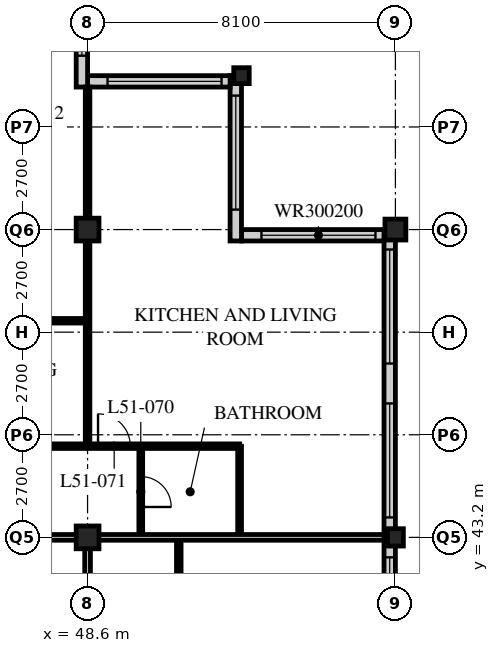
"""IFC4 building model, lengths in metres.
Left out: names, types, materials, properties, quantities, classifications, styles, units other than length and angle.
Written with IfcOpenShell. Run it as: python <this file> out.ifc"""

import sys

from ifc_helpers import new_model, si_unit, direction, frame, frame_2d, origin, origin_2d, place, context, subcontext, project, spatial, rectangle, hollow_rectangle, i_section, extrude, element, fill, save


model = new_model("IFC4")
c1 = context("Model", 3, precision=1e-05, world=origin(), true_north=direction((0.0, 1.0)))
c2 = subcontext(c1, "Body", "Model", "MODEL_VIEW")
j1 = project(units=[si_unit("LENGTHUNIT", "METRE"), si_unit("PLANEANGLEUNIT", "RADIAN")], contexts=[c1])
p1 = place(None, origin())
s1 = spatial("IfcSite", under=j1, at=p1, CompositionType="ELEMENT")
p2 = place(p1, origin())
s2 = spatial("IfcBuilding", under=s1, at=p2, CompositionType="ELEMENT")
p3 = place(p2, frame((0.0, 0.0, 199.2)))
s3 = spatial("IfcBuildingStorey", under=s2, at=p3, CompositionType="ELEMENT", Elevation=199.2)
for number, where, z_axis, x_axis in (
    (1, (48.6, 43.2, 0.0), (0.0, 0.0, 1.0), (1.0, 0.0, 0.0)),
    (2, (48.6, 51.3, 0.0), (0.0, 0.0, 1.0), (1.0, 0.0, 0.0)),
):
    element("IfcColumn", number, at=place(p3, frame(where, z_axis=z_axis, x_axis=x_axis)), inside=s3, PredefinedType="COLUMN", context=c2, shape_type="SweptSolid", body=[
        extrude(hollow_rectangle(XDim=0.6, YDim=0.6, WallThickness=0.05, at=origin_2d()), origin(), (0.0, 0.0, 1.0), 3.6),
    ])
p4 = place(p3, frame((52.65, 55.35, 0.0), z_axis=(0.0, 0.0, 1.0), x_axis=(1.0, 0.0, 0.0)))
e3 = element("IfcColumn", 3, at=p4, inside=s3, PredefinedType="COLUMN", context=c2, shape_type="SweptSolid", body=[
    extrude(i_section(OverallWidth=0.407, OverallDepth=0.419, WebThickness=0.031, FlangeThickness=0.049, FilletRadius=0.015, at=origin_2d()), origin(), (0.0, 0.0, 1.0), 3.6),
])
p5 = place(p3, frame((56.7, 43.2, 0.0), z_axis=(0.0, 0.0, 1.0), x_axis=(1.0, 0.0, 0.0)))
e4 = element("IfcColumn", 4, at=p5, inside=s3, PredefinedType="COLUMN", context=c2, shape_type="SweptSolid", body=[
    extrude(i_section(OverallWidth=0.418, OverallDepth=0.456, WebThickness=0.042, FlangeThickness=0.067, FilletRadius=0.015, at=origin_2d()), origin(), (0.0, 0.0, 1.0), 3.6),
])
p6 = place(p3, frame((56.7, 51.3, 0.0), z_axis=(0.0, 0.0, 1.0), x_axis=(1.0, 0.0, 0.0)))
e5 = element("IfcColumn", 5, at=p6, inside=s3, PredefinedType="COLUMN", context=c2, shape_type="SweptSolid", body=[
    extrude(hollow_rectangle(XDim=0.55, YDim=0.55, WallThickness=0.045, at=origin_2d()), origin(), (0.0, 0.0, 1.0), 3.6),
])
p7 = place(p3, frame((56.55, 19.2, 0.0), z_axis=(0.0, 0.0, 1.0), x_axis=(0.0, 1.0, 0.0)))
e6 = element("IfcWall", 6, at=p7, inside=s3, PredefinedType="SOLIDWALL", context=c2, shape_type="SweptSolid", body=[
    extrude(rectangle(XDim=32.1, YDim=0.3, at=frame_2d((16.05, 0.0))), origin(), (0.0, 0.0, 1.0), 3.39),
])
p8 = place(p7, frame((0.225, 0.0, 0.6)))
e7 = element("IfcOpeningElement", 7, at=p8, cuts=e6, PredefinedType="OPENING", context=c2, shape_type="SweptSolid", body=[
    extrude(rectangle(XDim=3.0, YDim=2.4, at=frame_2d((1.5, 1.2))), frame((0.0, 0.16, 0.0), z_axis=(0.0, -1.0, 0.0), x_axis=(1.0, 0.0, 0.0)), (0.0, 0.0, 1.0), 0.32),
])
p9 = place(p7, frame((4.275, 0.0, 0.6)))
e8 = element("IfcOpeningElement", 8, at=p9, cuts=e6, PredefinedType="OPENING", context=c2, shape_type="SweptSolid", body=[
    extrude(rectangle(XDim=3.0, YDim=2.4, at=frame_2d((1.5, 1.2))), frame((0.0, 0.16, 0.0), z_axis=(0.0, -1.0, 0.0), x_axis=(1.0, 0.0, 0.0)), (0.0, 0.0, 1.0), 0.32),
])
p10 = place(p7, frame((8.325, 0.0, 0.6)))
e9 = element("IfcOpeningElement", 9, at=p10, cuts=e6, PredefinedType="OPENING", context=c2, shape_type="SweptSolid", body=[
    extrude(rectangle(XDim=3.0, YDim=2.4, at=frame_2d((1.5, 1.2))), frame((0.0, 0.16, 0.0), z_axis=(0.0, -1.0, 0.0), x_axis=(1.0, 0.0, 0.0)), (0.0, 0.0, 1.0), 0.32),
])
p11 = place(p7, frame((12.375, 0.0, 0.6)))
e10 = element("IfcOpeningElement", 10, at=p11, cuts=e6, PredefinedType="OPENING", context=c2, shape_type="SweptSolid", body=[
    extrude(rectangle(XDim=3.0, YDim=2.4, at=frame_2d((1.5, 1.2))), frame((0.0, 0.16, 0.0), z_axis=(0.0, -1.0, 0.0), x_axis=(1.0, 0.0, 0.0)), (0.0, 0.0, 1.0), 0.32),
])
p12 = place(p7, frame((16.425, 0.0, 0.6)))
e11 = element("IfcOpeningElement", 11, at=p12, cuts=e6, PredefinedType="OPENING", context=c2, shape_type="SweptSolid", body=[
    extrude(rectangle(XDim=3.0, YDim=2.4, at=frame_2d((1.5, 1.2))), frame((0.0, 0.16, 0.0), z_axis=(0.0, -1.0, 0.0), x_axis=(1.0, 0.0, 0.0)), (0.0, 0.0, 1.0), 0.32),
])
p13 = place(p7, frame((20.475, 0.0, 0.6)))
e12 = element("IfcOpeningElement", 12, at=p13, cuts=e6, PredefinedType="OPENING", context=c2, shape_type="SweptSolid", body=[
    extrude(rectangle(XDim=3.0, YDim=2.4, at=frame_2d((1.5, 1.2))), frame((0.0, 0.16, 0.0), z_axis=(0.0, -1.0, 0.0), x_axis=(1.0, 0.0, 0.0)), (0.0, 0.0, 1.0), 0.32),
])
p14 = place(p7, frame((24.525, 0.0, 0.6)))
e13 = element("IfcOpeningElement", 13, at=p14, cuts=e6, PredefinedType="OPENING", context=c2, shape_type="SweptSolid", body=[
    extrude(rectangle(XDim=3.0, YDim=2.4, at=frame_2d((1.5, 1.2))), frame((0.0, 0.16, 0.0), z_axis=(0.0, -1.0, 0.0), x_axis=(1.0, 0.0, 0.0)), (0.0, 0.0, 1.0), 0.32),
])
p15 = place(p7, frame((28.575, 0.0, 0.6)))
e14 = element("IfcOpeningElement", 14, at=p15, cuts=e6, PredefinedType="OPENING", context=c2, shape_type="SweptSolid", body=[
    extrude(rectangle(XDim=3.0, YDim=2.4, at=frame_2d((1.5, 1.2))), frame((0.0, 0.16, 0.0), z_axis=(0.0, -1.0, 0.0), x_axis=(1.0, 0.0, 0.0)), (0.0, 0.0, 1.0), 0.32),
])
p16 = place(p3, frame((56.4, 51.15, 0.0), z_axis=(0.0, 0.0, 1.0), x_axis=(-1.0, 0.0, 0.0)))
e15 = element("IfcWall", 15, at=p16, inside=s3, PredefinedType="SOLIDWALL", context=c2, shape_type="SweptSolid", body=[
    extrude(rectangle(XDim=3.75, YDim=0.3, at=frame_2d((1.875, 0.0))), origin(), (0.0, 0.0, 1.0), 3.39),
])
p17 = place(p16, frame((0.225, 0.0, 0.6)))
e16 = element("IfcOpeningElement", 16, at=p17, cuts=e15, PredefinedType="OPENING", context=c2, shape_type="SweptSolid", body=[
    extrude(rectangle(XDim=3.0, YDim=2.0, at=frame_2d((1.5, 1.0))), frame((0.0, 0.16, 0.0), z_axis=(0.0, -1.0, 0.0), x_axis=(1.0, 0.0, 0.0)), (0.0, 0.0, 1.0), 0.32),
])
p18 = place(p3, frame((52.5, 51.0, 0.0), z_axis=(0.0, 0.0, 1.0), x_axis=(0.0, 1.0, 0.0)))
e17 = element("IfcWall", 17, at=p18, inside=s3, PredefinedType="SOLIDWALL", context=c2, shape_type="SweptSolid", body=[
    extrude(rectangle(XDim=4.35, YDim=0.3, at=frame_2d((2.175, 0.0))), origin(), (0.0, 0.0, 1.0), 3.39),
])
p19 = place(p18, frame((0.825, 0.0, 0.6)))
e18 = element("IfcOpeningElement", 18, at=p19, cuts=e17, PredefinedType="OPENING", context=c2, shape_type="SweptSolid", body=[
    extrude(rectangle(XDim=3.0, YDim=2.0, at=frame_2d((1.5, 1.0))), frame((0.0, 0.16, 0.0), z_axis=(0.0, -1.0, 0.0), x_axis=(1.0, 0.0, 0.0)), (0.0, 0.0, 1.0), 0.32),
])
p20 = place(p3, frame((52.35, 55.2, 0.0), z_axis=(0.0, 0.0, 1.0), x_axis=(-1.0, 0.0, 0.0)))
e19 = element("IfcWall", 19, at=p20, inside=s3, PredefinedType="SOLIDWALL", context=c2, shape_type="SweptSolid", body=[
    extrude(rectangle(XDim=3.75, YDim=0.3, at=frame_2d((1.875, 0.0))), origin(), (0.0, 0.0, 1.0), 3.39),
])
p21 = place(p20, frame((0.225, 0.0, 0.6)))
e20 = element("IfcOpeningElement", 20, at=p21, cuts=e19, PredefinedType="OPENING", context=c2, shape_type="SweptSolid", body=[
    extrude(rectangle(XDim=3.0, YDim=2.0, at=frame_2d((1.5, 1.0))), frame((0.0, 0.16, 0.0), z_axis=(0.0, -1.0, 0.0), x_axis=(1.0, 0.0, 0.0)), (0.0, 0.0, 1.0), 0.32),
])
p22 = place(p3, frame((48.45, 55.05, 0.0), z_axis=(0.0, 0.0, 1.0), x_axis=(0.0, 1.0, 0.0)))
e21 = element("IfcWall", 21, at=p22, inside=s3, PredefinedType="SOLIDWALL", context=c2, shape_type="SweptSolid", body=[
    extrude(rectangle(XDim=4.35, YDim=0.3, at=frame_2d((2.175, 0.0))), origin(), (0.0, 0.0, 1.0), 3.39),
])
p23 = place(p22, frame((0.825, 0.0, 0.6)))
e22 = element("IfcOpeningElement", 22, at=p23, cuts=e21, PredefinedType="OPENING", context=c2, shape_type="SweptSolid", body=[
    extrude(rectangle(XDim=3.0, YDim=2.0, at=frame_2d((1.5, 1.0))), frame((0.0, 0.16, 0.0), z_axis=(0.0, -1.0, 0.0), x_axis=(1.0, 0.0, 0.0)), (0.0, 0.0, 1.0), 0.32),
])
p24 = place(p3, frame((8.1, 43.2, 0.0), z_axis=(0.0, 0.0, 1.0), x_axis=(1.0, 0.0, 0.0)))
e23 = element("IfcWall", 23, at=p24, inside=s3, PredefinedType="PARTITIONING", context=c2, shape_type="SweptSolid", body=[
    extrude(rectangle(XDim=40.5, YDim=0.15, at=frame_2d((20.25, 0.0))), origin(), (0.0, 0.0, 1.0), 2.778),
])
p25 = place(p24, frame((4.45, 0.0, 0.0)))
e24 = element("IfcOpeningElement", 24, at=p25, cuts=e23, PredefinedType="OPENING", context=c2, shape_type="SweptSolid", body=[
    extrude(rectangle(XDim=1.0, YDim=2.1, at=frame_2d((0.5, 1.05))), frame((0.0, 0.085, 0.0), z_axis=(0.0, -1.0, 0.0), x_axis=(1.0, 0.0, 0.0)), (0.0, 0.0, 1.0), 0.17),
])
p26 = place(p24, frame((20.65, 0.0, 0.0)))
e25 = element("IfcOpeningElement", 25, at=p26, cuts=e23, PredefinedType="OPENING", context=c2, shape_type="SweptSolid", body=[
    extrude(rectangle(XDim=1.0, YDim=2.1, at=frame_2d((0.5, 1.05))), frame((0.0, 0.085, 0.0), z_axis=(0.0, -1.0, 0.0), x_axis=(1.0, 0.0, 0.0)), (0.0, 0.0, 1.0), 0.17),
])
p27 = place(p24, frame((28.75, 0.0, 0.0)))
e26 = element("IfcOpeningElement", 26, at=p27, cuts=e23, PredefinedType="OPENING", context=c2, shape_type="SweptSolid", body=[
    extrude(rectangle(XDim=1.0, YDim=2.1, at=frame_2d((0.5, 1.05))), frame((0.0, 0.085, 0.0), z_axis=(0.0, -1.0, 0.0), x_axis=(1.0, 0.0, 0.0)), (0.0, 0.0, 1.0), 0.17),
])
p28 = place(p24, frame((37.975, 0.0, 0.0)))
e27 = element("IfcOpeningElement", 27, at=p28, cuts=e23, PredefinedType="OPENING", context=c2, shape_type="SweptSolid", body=[
    extrude(rectangle(XDim=1.0, YDim=2.1, at=frame_2d((0.5, 1.05))), frame((0.0, 0.085, 0.0), z_axis=(0.0, -1.0, 0.0), x_axis=(1.0, 0.0, 0.0)), (0.0, 0.0, 1.0), 0.17),
])
p29 = place(p24, frame((1.525, 0.0, 0.0)))
e28 = element("IfcOpeningElement", 28, at=p29, cuts=e23, PredefinedType="OPENING", context=c2, shape_type="SweptSolid", body=[
    extrude(rectangle(XDim=1.0, YDim=2.1, at=frame_2d((0.5, 1.05))), frame((0.0, 0.085, 0.0), z_axis=(0.0, -1.0, 0.0), x_axis=(1.0, 0.0, 0.0)), (0.0, 0.0, 1.0), 0.17),
])
p30 = place(p3, frame((48.6, 18.9, 0.0), z_axis=(0.0, 0.0, 1.0), x_axis=(0.0, 1.0, 0.0)))
e29 = element("IfcWall", 29, at=p30, inside=s3, PredefinedType="PARTITIONING", context=c2, shape_type="SweptSolid", body=[
    extrude(rectangle(XDim=24.3, YDim=0.15, at=frame_2d((12.15, 0.0))), origin(), (0.0, 0.0, 1.0), 2.778),
])
p31 = place(p30, frame((2.35, 0.0, 0.0)))
e30 = element("IfcOpeningElement", 30, at=p31, cuts=e29, PredefinedType="OPENING", context=c2, shape_type="SweptSolid", body=[
    extrude(rectangle(XDim=1.0, YDim=2.1, at=frame_2d((0.5, 1.05))), frame((0.0, 0.085, 0.0), z_axis=(0.0, -1.0, 0.0), x_axis=(1.0, 0.0, 0.0)), (0.0, 0.0, 1.0), 0.17),
])
p32 = place(p30, frame((4.75, 0.0, 0.0)))
e31 = element("IfcOpeningElement", 31, at=p32, cuts=e29, PredefinedType="OPENING", context=c2, shape_type="SweptSolid", body=[
    extrude(rectangle(XDim=1.0, YDim=2.1, at=frame_2d((0.5, 1.05))), frame((0.0, 0.085, 0.0), z_axis=(0.0, -1.0, 0.0), x_axis=(1.0, 0.0, 0.0)), (0.0, 0.0, 1.0), 0.17),
])
p33 = place(p30, frame((9.0, 0.0, 0.0)))
e32 = element("IfcOpeningElement", 32, at=p33, cuts=e29, PredefinedType="OPENING", context=c2, shape_type="SweptSolid", body=[
    extrude(rectangle(XDim=1.0, YDim=2.1, at=frame_2d((0.5, 1.05))), frame((0.0, 0.085, 0.0), z_axis=(0.0, -1.0, 0.0), x_axis=(1.0, 0.0, 0.0)), (0.0, 0.0, 1.0), 0.17),
])
p34 = place(p3, frame((51.0, 27.0, 0.0), z_axis=(0.0, 0.0, 1.0), x_axis=(0.0, 1.0, 0.0)))
e33 = element("IfcWall", 33, at=p34, inside=s3, PredefinedType="PARTITIONING", context=c2, shape_type="SweptSolid", body=[
    extrude(rectangle(XDim=16.2, YDim=0.12, at=frame_2d((8.1, 0.0))), origin(), (0.0, 0.0, 1.0), 3.39),
])
p35 = place(p34, frame((0.975, 0.0, 0.0)))
e34 = element("IfcOpeningElement", 34, at=p35, cuts=e33, PredefinedType="OPENING", context=c2, shape_type="SweptSolid", body=[
    extrude(rectangle(XDim=0.85, YDim=2.1, at=frame_2d((0.425, 1.05))), frame((0.0, 0.07, 0.0), z_axis=(0.0, -1.0, 0.0), x_axis=(1.0, 0.0, 0.0)), (0.0, 0.0, 1.0), 0.14),
])
p36 = place(p34, frame((8.425, 0.0, 0.0)))
e35 = element("IfcOpeningElement", 35, at=p36, cuts=e33, PredefinedType="OPENING", context=c2, shape_type="SweptSolid", body=[
    extrude(rectangle(XDim=0.85, YDim=2.1, at=frame_2d((0.425, 1.05))), frame((0.0, 0.07, 0.0), z_axis=(0.0, -1.0, 0.0), x_axis=(1.0, 0.0, 0.0)), (0.0, 0.0, 1.0), 0.14),
])
p37 = place(p34, frame((12.475, 0.0, 0.0)))
e36 = element("IfcOpeningElement", 36, at=p37, cuts=e33, PredefinedType="OPENING", context=c2, shape_type="SweptSolid", body=[
    extrude(rectangle(XDim=0.85, YDim=2.1, at=frame_2d((0.425, 1.05))), frame((0.0, 0.07, 0.0), z_axis=(0.0, -1.0, 0.0), x_axis=(1.0, 0.0, 0.0)), (0.0, 0.0, 1.0), 0.14),
])
p38 = place(p3, frame((50.0, 43.2, 0.0), z_axis=(0.0, 0.0, 1.0), x_axis=(0.0, 1.0, 0.0)))
e37 = element("IfcWall", 37, at=p38, inside=s3, PredefinedType="PARTITIONING", context=c2, shape_type="SweptSolid", body=[
    extrude(rectangle(XDim=2.4, YDim=0.1, at=frame_2d((1.2, 0.0))), origin(), (0.0, 0.0, 1.0), 3.39),
])
p39 = place(p38, frame((0.8, 0.0, 0.0)))
e38 = element("IfcOpeningElement", 38, at=p39, cuts=e37, PredefinedType="OPENING", context=c2, shape_type="SweptSolid", body=[
    extrude(rectangle(XDim=0.8, YDim=2.1, at=frame_2d((0.4, 1.05))), frame((0.0, 0.06, 0.0), z_axis=(0.0, -1.0, 0.0), x_axis=(1.0, 0.0, 0.0)), (0.0, 0.0, 1.0), 0.12),
])
p40 = place(p3, frame((52.6, 43.2, 0.0), z_axis=(0.0, 0.0, 1.0), x_axis=(0.0, 1.0, 0.0)))
e39 = element("IfcWall", 39, at=p40, inside=s3, PredefinedType="PARTITIONING", context=c2, shape_type="SweptSolid", body=[
    extrude(rectangle(XDim=2.4, YDim=0.1, at=frame_2d((1.2, 0.0))), origin(), (0.0, 0.0, 1.0), 3.39),
])
p41 = place(p3, frame((48.6, 45.6, 0.0), z_axis=(0.0, 0.0, 1.0), x_axis=(0.0, 1.0, 0.0)))
e40 = element("IfcWall", 40, at=p41, inside=s3, PredefinedType="PARTITIONING", context=c2, shape_type="SweptSolid", body=[
    extrude(rectangle(XDim=9.45, YDim=0.12, at=frame_2d((4.725, 0.0))), origin(), (0.0, 0.0, 1.0), 2.778),
])
p42 = place(p3, frame((48.6, 43.2, 0.0), z_axis=(0.0, 0.0, 1.0), x_axis=(1.0, 0.0, 0.0)))
e41 = element("IfcWall", 41, at=p42, inside=s3, PredefinedType="PARTITIONING", context=c2, shape_type="SweptSolid", body=[
    extrude(rectangle(XDim=7.8, YDim=0.15, at=frame_2d((3.9, 0.0))), origin(), (0.0, 0.0, 1.0), 2.778),
])
p43 = place(p3, frame((4.1, 45.6, 0.0), z_axis=(0.0, 0.0, 1.0), x_axis=(1.0, 0.0, 0.0)))
e42 = element("IfcWall", 42, at=p43, inside=s3, PredefinedType="PARTITIONING", context=c2, shape_type="SweptSolid", body=[
    extrude(rectangle(XDim=48.5, YDim=0.12, at=frame_2d((24.25, 0.0))), origin(), (0.0, 0.0, 1.0), 3.39),
])
p44 = place(p43, frame((9.025, 0.0, 0.0)))
e43 = element("IfcOpeningElement", 43, at=p44, cuts=e42, PredefinedType="OPENING", context=c2, shape_type="SweptSolid", body=[
    extrude(rectangle(XDim=0.85, YDim=2.1, at=frame_2d((0.425, 1.05))), frame((0.0, 0.07, 0.0), z_axis=(0.0, -1.0, 0.0), x_axis=(1.0, 0.0, 0.0)), (0.0, 0.0, 1.0), 0.14),
])
p45 = place(p43, frame((16.475, 0.0, 0.0)))
e44 = element("IfcOpeningElement", 44, at=p45, cuts=e42, PredefinedType="OPENING", context=c2, shape_type="SweptSolid", body=[
    extrude(rectangle(XDim=0.85, YDim=2.1, at=frame_2d((0.425, 1.05))), frame((0.0, 0.07, 0.0), z_axis=(0.0, -1.0, 0.0), x_axis=(1.0, 0.0, 0.0)), (0.0, 0.0, 1.0), 0.14),
])
p46 = place(p43, frame((20.525, 0.0, 0.0)))
e45 = element("IfcOpeningElement", 45, at=p46, cuts=e42, PredefinedType="OPENING", context=c2, shape_type="SweptSolid", body=[
    extrude(rectangle(XDim=0.85, YDim=2.1, at=frame_2d((0.425, 1.05))), frame((0.0, 0.07, 0.0), z_axis=(0.0, -1.0, 0.0), x_axis=(1.0, 0.0, 0.0)), (0.0, 0.0, 1.0), 0.14),
])
p47 = place(p43, frame((25.225, 0.0, 0.0)))
e46 = element("IfcOpeningElement", 46, at=p47, cuts=e42, PredefinedType="OPENING", context=c2, shape_type="SweptSolid", body=[
    extrude(rectangle(XDim=0.85, YDim=2.1, at=frame_2d((0.425, 1.05))), frame((0.0, 0.07, 0.0), z_axis=(0.0, -1.0, 0.0), x_axis=(1.0, 0.0, 0.0)), (0.0, 0.0, 1.0), 0.14),
])
p48 = place(p43, frame((28.625, 0.0, 0.0)))
e47 = element("IfcOpeningElement", 47, at=p48, cuts=e42, PredefinedType="OPENING", context=c2, shape_type="SweptSolid", body=[
    extrude(rectangle(XDim=0.85, YDim=2.1, at=frame_2d((0.425, 1.05))), frame((0.0, 0.07, 0.0), z_axis=(0.0, -1.0, 0.0), x_axis=(1.0, 0.0, 0.0)), (0.0, 0.0, 1.0), 0.14),
])
p49 = place(p43, frame((33.325, 0.0, 0.0)))
e48 = element("IfcOpeningElement", 48, at=p49, cuts=e42, PredefinedType="OPENING", context=c2, shape_type="SweptSolid", body=[
    extrude(rectangle(XDim=0.85, YDim=2.1, at=frame_2d((0.425, 1.05))), frame((0.0, 0.07, 0.0), z_axis=(0.0, -1.0, 0.0), x_axis=(1.0, 0.0, 0.0)), (0.0, 0.0, 1.0), 0.14),
])
p50 = place(p43, frame((36.725, 0.0, 0.0)))
e49 = element("IfcOpeningElement", 49, at=p50, cuts=e42, PredefinedType="OPENING", context=c2, shape_type="SweptSolid", body=[
    extrude(rectangle(XDim=0.85, YDim=2.1, at=frame_2d((0.425, 1.05))), frame((0.0, 0.07, 0.0), z_axis=(0.0, -1.0, 0.0), x_axis=(1.0, 0.0, 0.0)), (0.0, 0.0, 1.0), 0.14),
])
p51 = place(p43, frame((40.925, 0.0, 0.0)))
e50 = element("IfcOpeningElement", 50, at=p51, cuts=e42, PredefinedType="OPENING", context=c2, shape_type="SweptSolid", body=[
    extrude(rectangle(XDim=0.85, YDim=2.1, at=frame_2d((0.425, 1.05))), frame((0.0, 0.07, 0.0), z_axis=(0.0, -1.0, 0.0), x_axis=(1.0, 0.0, 0.0)), (0.0, 0.0, 1.0), 0.14),
])
p52 = place(p43, frame((44.775, 0.0, 0.0)))
e51 = element("IfcOpeningElement", 51, at=p52, cuts=e42, PredefinedType="OPENING", context=c2, shape_type="SweptSolid", body=[
    extrude(rectangle(XDim=0.85, YDim=2.1, at=frame_2d((0.425, 1.05))), frame((0.0, 0.07, 0.0), z_axis=(0.0, -1.0, 0.0), x_axis=(1.0, 0.0, 0.0)), (0.0, 0.0, 1.0), 0.14),
])
p53 = place(p43, frame((6.725, 0.0, 0.0)))
e52 = element("IfcOpeningElement", 52, at=p53, cuts=e42, PredefinedType="OPENING", context=c2, shape_type="SweptSolid", body=[
    extrude(rectangle(XDim=0.85, YDim=2.1, at=frame_2d((0.425, 1.05))), frame((0.0, 0.07, 0.0), z_axis=(0.0, -1.0, 0.0), x_axis=(1.0, 0.0, 0.0)), (0.0, 0.0, 1.0), 0.14),
])
p54 = place(p43, frame((2.875, 0.0, 0.0)))
e53 = element("IfcOpeningElement", 53, at=p54, cuts=e42, PredefinedType="OPENING", context=c2, shape_type="SweptSolid", body=[
    extrude(rectangle(XDim=0.85, YDim=2.1, at=frame_2d((0.425, 1.05))), frame((0.0, 0.07, 0.0), z_axis=(0.0, -1.0, 0.0), x_axis=(1.0, 0.0, 0.0)), (0.0, 0.0, 1.0), 0.14),
])
p55 = place(p3, frame((40.5, 48.9, 0.0), z_axis=(0.0, 0.0, 1.0), x_axis=(1.0, 0.0, 0.0)))
e54 = element("IfcWall", 54, at=p55, inside=s3, PredefinedType="PARTITIONING", context=c2, shape_type="SweptSolid", body=[
    extrude(rectangle(XDim=8.1, YDim=0.12, at=frame_2d((4.05, 0.0))), origin(), (0.0, 0.0, 1.0), 3.39),
])
p56 = place(p55, frame((1.6, 0.0, 0.0)))
e55 = element("IfcOpeningElement", 55, at=p56, cuts=e54, PredefinedType="OPENING", context=c2, shape_type="SweptSolid", body=[
    extrude(rectangle(XDim=0.85, YDim=2.1, at=frame_2d((0.425, 1.05))), frame((0.0, 0.07, 0.0), z_axis=(0.0, -1.0, 0.0), x_axis=(1.0, 0.0, 0.0)), (0.0, 0.0, 1.0), 0.14),
])
p57 = place(p55, frame((5.65, 0.0, 0.0)))
e56 = element("IfcOpeningElement", 56, at=p57, cuts=e54, PredefinedType="OPENING", context=c2, shape_type="SweptSolid", body=[
    extrude(rectangle(XDim=0.85, YDim=2.1, at=frame_2d((0.425, 1.05))), frame((0.0, 0.07, 0.0), z_axis=(0.0, -1.0, 0.0), x_axis=(1.0, 0.0, 0.0)), (0.0, 0.0, 1.0), 0.14),
])
p58 = place(p13, origin())
e57 = element("IfcWindow", 57, at=p58, inside=s3, PartitioningType="SINGLE_PANEL", PredefinedType="WINDOW", context=c2, shape_type="SweptSolid", body=[
    extrude(rectangle(XDim=3.0, YDim=2.4, at=frame_2d((1.5, 1.2))), frame((0.0, 0.03, 0.0), z_axis=(0.0, -1.0, 0.0), x_axis=(1.0, 0.0, 0.0)), (0.0, 0.0, 1.0), 0.06),
])
fill(e12, e57)
p59 = place(p14, origin())
e58 = element("IfcWindow", 58, at=p59, inside=s3, PartitioningType="SINGLE_PANEL", PredefinedType="WINDOW", context=c2, shape_type="SweptSolid", body=[
    extrude(rectangle(XDim=3.0, YDim=2.4, at=frame_2d((1.5, 1.2))), frame((0.0, 0.03, 0.0), z_axis=(0.0, -1.0, 0.0), x_axis=(1.0, 0.0, 0.0)), (0.0, 0.0, 1.0), 0.06),
])
fill(e13, e58)
p60 = place(p15, origin())
e59 = element("IfcWindow", 59, at=p60, inside=s3, PartitioningType="SINGLE_PANEL", PredefinedType="WINDOW", context=c2, shape_type="SweptSolid", body=[
    extrude(rectangle(XDim=3.0, YDim=2.4, at=frame_2d((1.5, 1.2))), frame((0.0, 0.03, 0.0), z_axis=(0.0, -1.0, 0.0), x_axis=(1.0, 0.0, 0.0)), (0.0, 0.0, 1.0), 0.06),
])
fill(e14, e59)
p61 = place(p17, origin())
e60 = element("IfcWindow", 60, at=p61, inside=s3, PartitioningType="SINGLE_PANEL", PredefinedType="WINDOW", context=c2, shape_type="SweptSolid", body=[
    extrude(rectangle(XDim=3.0, YDim=2.0, at=frame_2d((1.5, 1.0))), frame((0.0, 0.03, 0.0), z_axis=(0.0, -1.0, 0.0), x_axis=(1.0, 0.0, 0.0)), (0.0, 0.0, 1.0), 0.06),
])
fill(e16, e60)
p62 = place(p19, origin())
e61 = element("IfcWindow", 61, at=p62, inside=s3, PartitioningType="SINGLE_PANEL", PredefinedType="WINDOW", context=c2, shape_type="SweptSolid", body=[
    extrude(rectangle(XDim=3.0, YDim=2.0, at=frame_2d((1.5, 1.0))), frame((0.0, 0.03, 0.0), z_axis=(0.0, -1.0, 0.0), x_axis=(1.0, 0.0, 0.0)), (0.0, 0.0, 1.0), 0.06),
])
fill(e18, e61)
p63 = place(p21, origin())
e62 = element("IfcWindow", 62, at=p63, inside=s3, PartitioningType="SINGLE_PANEL", PredefinedType="WINDOW", context=c2, shape_type="SweptSolid", body=[
    extrude(rectangle(XDim=3.0, YDim=2.0, at=frame_2d((1.5, 1.0))), frame((0.0, 0.03, 0.0), z_axis=(0.0, -1.0, 0.0), x_axis=(1.0, 0.0, 0.0)), (0.0, 0.0, 1.0), 0.06),
])
fill(e20, e62)
p64 = place(p23, origin())
e63 = element("IfcWindow", 63, at=p64, inside=s3, PartitioningType="SINGLE_PANEL", PredefinedType="WINDOW", context=c2, shape_type="SweptSolid", body=[
    extrude(rectangle(XDim=3.0, YDim=2.0, at=frame_2d((1.5, 1.0))), frame((0.0, 0.03, 0.0), z_axis=(0.0, -1.0, 0.0), x_axis=(1.0, 0.0, 0.0)), (0.0, 0.0, 1.0), 0.06),
])
fill(e22, e63)
p65 = place(p39, origin())
e64 = element("IfcDoor", 64, at=p65, inside=s3, OperationType="SINGLE_SWING_RIGHT", PredefinedType="DOOR", context=c2, shape_type="SweptSolid", body=[
    extrude(rectangle(XDim=0.8, YDim=2.1, at=frame_2d((0.4, 1.05))), frame((0.0, 0.025, 0.0), z_axis=(0.0, -1.0, 0.0), x_axis=(1.0, 0.0, 0.0)), (0.0, 0.0, 1.0), 0.05),
])
fill(e38, e64)
p66 = place(p52, origin())
e65 = element("IfcDoor", 65, at=p66, inside=s3, OperationType="SINGLE_SWING_LEFT", PredefinedType="DOOR", context=c2, shape_type="SweptSolid", body=[
    extrude(rectangle(XDim=0.85, YDim=2.1, at=frame_2d((0.425, 1.05))), frame((0.0, 0.025, 0.0), z_axis=(0.0, -1.0, 0.0), x_axis=(1.0, 0.0, 0.0)), (0.0, 0.0, 1.0), 0.05),
])
fill(e51, e65)
save(model, sys.argv[1])
